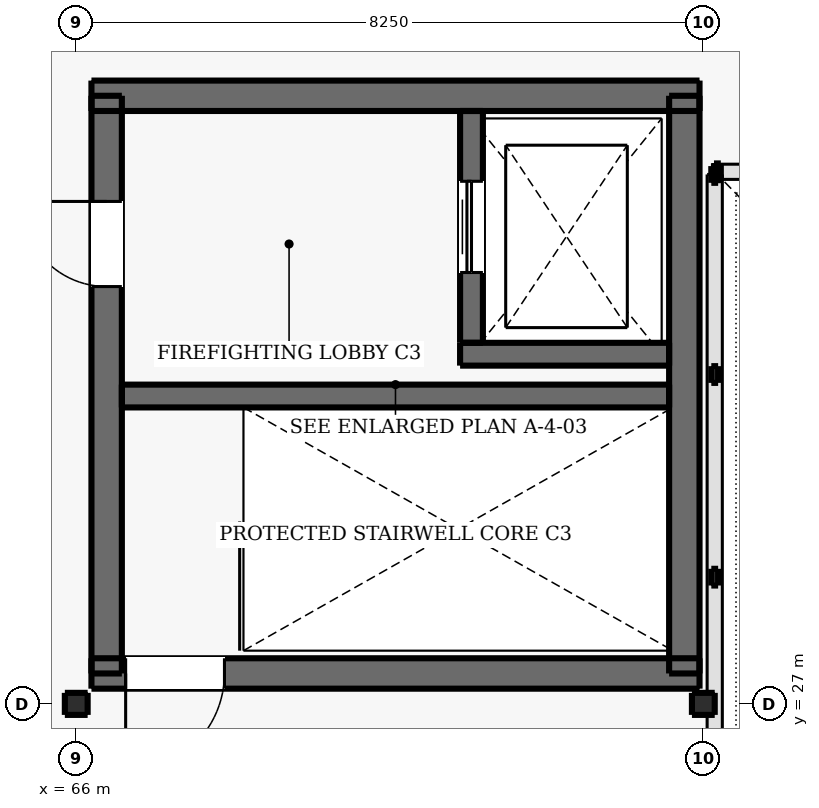
"""IFC4 building model, lengths in metres.
Left out: names, types, materials, properties, quantities, classifications, styles, units other than length and angle.
Written with IfcOpenShell. Run it as: python <this file> out.ifc"""

import sys

from ifc_helpers import new_model, si_unit, direction, frame, frame_2d, origin, origin_2d, place, context, subcontext, project, spatial, rectangle, i_section, extrude, element, fill, save


model = new_model("IFC4")
c1 = context("Model", 3, precision=1e-05, world=origin(), true_north=direction((0.0, 1.0)))
c2 = subcontext(c1, "Body", "Model", "MODEL_VIEW")
j1 = project(units=[si_unit("LENGTHUNIT", "METRE"), si_unit("PLANEANGLEUNIT", "RADIAN")], contexts=[c1])
p1 = place(None, origin())
s1 = spatial("IfcSite", under=j1, at=p1, CompositionType="ELEMENT")
p2 = place(p1, origin())
s2 = spatial("IfcBuilding", under=s1, at=p2, CompositionType="ELEMENT")
p3 = place(p2, frame((0.0, 0.0, 26.4)))
s3 = spatial("IfcBuildingStorey", under=s2, at=p3, CompositionType="ELEMENT", Elevation=26.4)
for number, where, z_axis, x_axis in (
    (1, (66.0, 27.0, 0.0), (0.0, 0.0, 1.0), (1.0, 0.0, 0.0)),
    (2, (74.25, 27.0, 0.0), (0.0, 0.0, 1.0), (1.0, 0.0, 0.0)),
):
    element("IfcColumn", number, at=place(p3, frame(where, z_axis=z_axis, x_axis=x_axis)), inside=s3, PredefinedType="COLUMN", context=c2, shape_type="SweptSolid", body=[
        extrude(i_section(OverallWidth=0.3, OverallDepth=0.29, WebThickness=0.009, FlangeThickness=0.014, FilletRadius=0.027, at=origin_2d()), origin(), (0.0, 0.0, 1.0), 4.2),
    ])
p4 = place(p3, frame((66.2, 27.4, 0.0), z_axis=(0.0, 0.0, 1.0), x_axis=(1.0, 0.0, 0.0)))
e3 = element("IfcWall", 3, at=p4, inside=s3, PredefinedType="SHEAR", context=c2, shape_type="SweptSolid", body=[
    extrude(rectangle(XDim=8.0, YDim=0.4, at=frame_2d((4.0, 0.0))), origin(), (0.0, 0.0, 1.0), 4.2),
])
p5 = place(p4, frame((0.45, 0.0, 0.0)))
e4 = element("IfcOpeningElement", 4, at=p5, cuts=e3, PredefinedType="OPENING", context=c2, shape_type="SweptSolid", body=[
    extrude(rectangle(XDim=1.3, YDim=2.15, at=frame_2d((0.65, 1.075))), frame((0.0, 0.21, 0.0), z_axis=(0.0, -1.0, 0.0), x_axis=(1.0, 0.0, 0.0)), (0.0, 0.0, 1.0), 0.42),
])
p6 = place(p3, frame((66.2, 35.0, 0.0), z_axis=(0.0, 0.0, 1.0), x_axis=(1.0, 0.0, 0.0)))
e5 = element("IfcWall", 5, at=p6, inside=s3, PredefinedType="SHEAR", context=c2, shape_type="SweptSolid", body=[
    extrude(rectangle(XDim=8.0, YDim=0.4, at=frame_2d((4.0, 0.0))), origin(), (0.0, 0.0, 1.0), 4.2),
])
p7 = place(p3, frame((66.4, 27.4, 0.0), z_axis=(0.0, 0.0, 1.0), x_axis=(0.0, 1.0, 0.0)))
e6 = element("IfcWall", 6, at=p7, inside=s3, PredefinedType="SHEAR", context=c2, shape_type="SweptSolid", body=[
    extrude(rectangle(XDim=7.6, YDim=0.4, at=frame_2d((3.8, 0.0))), origin(), (0.0, 0.0, 1.0), 4.2),
])
p8 = place(p7, frame((5.09, 0.0, 0.0)))
e7 = element("IfcOpeningElement", 7, at=p8, cuts=e6, PredefinedType="OPENING", context=c2, shape_type="SweptSolid", body=[
    extrude(rectangle(XDim=1.12, YDim=2.15, at=frame_2d((0.56, 1.075))), frame((0.0, 0.21, 0.0), z_axis=(0.0, -1.0, 0.0), x_axis=(1.0, 0.0, 0.0)), (0.0, 0.0, 1.0), 0.42),
])
p9 = place(p3, frame((74.0, 27.4, 0.0), z_axis=(0.0, 0.0, 1.0), x_axis=(0.0, 1.0, 0.0)))
e8 = element("IfcWall", 8, at=p9, inside=s3, PredefinedType="SHEAR", context=c2, shape_type="SweptSolid", body=[
    extrude(rectangle(XDim=7.6, YDim=0.4, at=frame_2d((3.8, 0.0))), origin(), (0.0, 0.0, 1.0), 4.2),
])
p10 = place(p3, frame((66.6, 31.05, 0.0), z_axis=(0.0, 0.0, 1.0), x_axis=(1.0, 0.0, 0.0)))
e9 = element("IfcWall", 9, at=p10, inside=s3, PredefinedType="SHEAR", context=c2, shape_type="SweptSolid", body=[
    extrude(rectangle(XDim=7.2, YDim=0.3, at=frame_2d((3.6, 0.0))), origin(), (0.0, 0.0, 1.0), 4.2),
])
p11 = place(p3, frame((71.05, 31.6, 0.0), z_axis=(0.0, 0.0, 1.0), x_axis=(1.0, 0.0, 0.0)))
e10 = element("IfcWall", 10, at=p11, inside=s3, PredefinedType="SHEAR", context=c2, shape_type="SweptSolid", body=[
    extrude(rectangle(XDim=2.75, YDim=0.3, at=frame_2d((1.375, 0.0))), origin(), (0.0, 0.0, 1.0), 4.2),
])
p12 = place(p3, frame((71.2, 31.75, 0.0), z_axis=(0.0, 0.0, 1.0), x_axis=(0.0, 1.0, 0.0)))
e11 = element("IfcWall", 11, at=p12, inside=s3, PredefinedType="SHEAR", context=c2, shape_type="SweptSolid", body=[
    extrude(rectangle(XDim=3.05, YDim=0.3, at=frame_2d((1.525, 0.0))), origin(), (0.0, 0.0, 1.0), 4.2),
])
p13 = place(p12, frame((0.925, 0.0, 0.0)))
e12 = element("IfcOpeningElement", 12, at=p13, cuts=e11, PredefinedType="OPENING", context=c2, shape_type="SweptSolid", body=[
    extrude(rectangle(XDim=1.2, YDim=2.15, at=frame_2d((0.6, 1.075))), frame((0.0, 0.16, 0.0), z_axis=(0.0, -1.0, 0.0), x_axis=(1.0, 0.0, 0.0)), (0.0, 0.0, 1.0), 0.32),
])
p14 = place(p13, origin())
e13 = element("IfcDoor", 13, at=p14, inside=s3, OperationType="DOUBLE_DOOR_SLIDING", PredefinedType="DOOR", context=c2, shape_type="SweptSolid", body=[
    extrude(rectangle(XDim=1.2, YDim=2.15, at=frame_2d((0.6, 1.075))), frame((0.0, 0.025, 0.0), z_axis=(0.0, -1.0, 0.0), x_axis=(1.0, 0.0, 0.0)), (0.0, 0.0, 1.0), 0.05),
])
fill(e12, e13)
p15 = place(p8, origin())
e14 = element("IfcDoor", 14, at=p15, inside=s3, OperationType="SINGLE_SWING_RIGHT", PredefinedType="DOOR", context=c2, shape_type="SweptSolid", body=[
    extrude(rectangle(XDim=1.12, YDim=2.15, at=frame_2d((0.56, 1.075))), frame((0.0, 0.025, 0.0), z_axis=(0.0, -1.0, 0.0), x_axis=(1.0, 0.0, 0.0)), (0.0, 0.0, 1.0), 0.05),
])
fill(e7, e14)
p16 = place(p5, frame((1.3, 0.0, 0.0), z_axis=(0.0, 0.0, 1.0), x_axis=(-1.0, 0.0, 0.0)))
e15 = element("IfcDoor", 15, at=p16, inside=s3, OperationType="SINGLE_SWING_LEFT", PredefinedType="DOOR", context=c2, shape_type="SweptSolid", body=[
    extrude(rectangle(XDim=1.3, YDim=2.15, at=frame_2d((0.65, 1.075))), frame((0.0, 0.025, 0.0), z_axis=(0.0, -1.0, 0.0), x_axis=(1.0, 0.0, 0.0)), (0.0, 0.0, 1.0), 0.05),
])
fill(e4, e15)
save(model, sys.argv[1])
